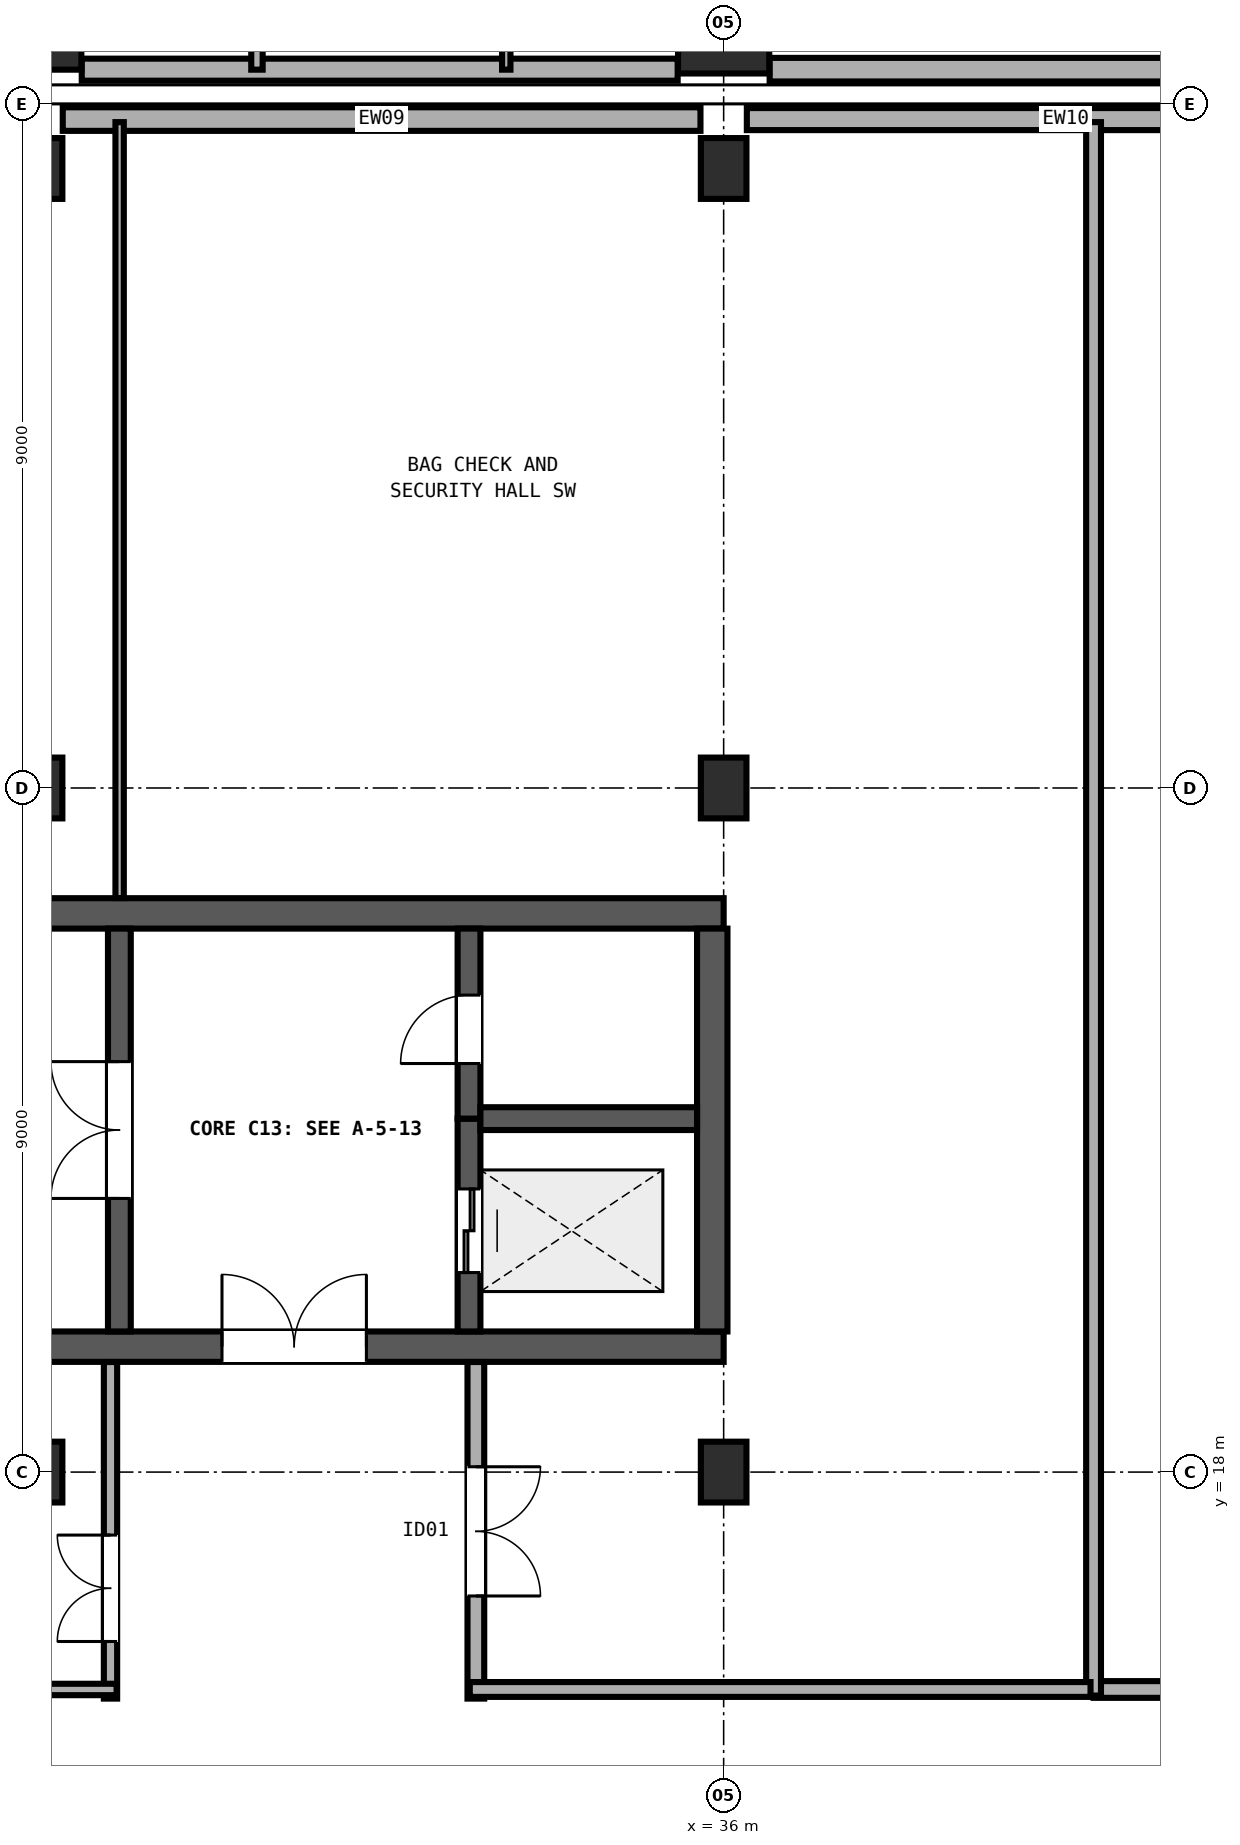
"""IFC4 building model, lengths in metres.
Left out: names, types, materials, properties, quantities, classifications, styles, units other than length and angle.
Written with IfcOpenShell. Run it as: python <this file> out.ifc"""

import sys

from ifc_helpers import new_model, si_unit, direction, frame, frame_2d, origin, origin_2d, place, context, subcontext, project, spatial, rectangle, extrude, element, fill, save


model = new_model("IFC4")
c1 = context("Model", 3, precision=1e-05, world=origin(), true_north=direction((0.0, 1.0)))
c2 = subcontext(c1, "Body", "Model", "MODEL_VIEW")
j1 = project(units=[si_unit("LENGTHUNIT", "METRE"), si_unit("PLANEANGLEUNIT", "RADIAN")], contexts=[c1])
p1 = place(None, origin())
s1 = spatial("IfcSite", under=j1, at=p1, CompositionType="ELEMENT")
p2 = place(p1, origin())
s2 = spatial("IfcBuilding", under=s1, at=p2, CompositionType="ELEMENT")
p3 = place(p2, origin())
s3 = spatial("IfcBuildingStorey", under=s2, at=p3, CompositionType="ELEMENT", Elevation=0.0)
p4 = place(p3, frame((27.0, 37.1, 0.0), z_axis=(0.0, 0.0, 1.0), x_axis=(1.0, 0.0, 0.0)))
e1 = element("IfcColumn", 1, at=p4, inside=s3, PredefinedType="COLUMN", context=c2, shape_type="SweptSolid", body=[
    extrude(rectangle(XDim=1.1, YDim=1.3, at=origin_2d()), origin(), (0.0, 0.0, 1.0), 4.8),
])
p5 = place(p3, frame((36.0, 37.1, 0.0), z_axis=(0.0, 0.0, 1.0), x_axis=(1.0, 0.0, 0.0)))
e2 = element("IfcColumn", 2, at=p5, inside=s3, PredefinedType="COLUMN", context=c2, shape_type="SweptSolid", body=[
    extrude(rectangle(XDim=1.2, YDim=1.4, at=origin_2d()), origin(), (0.0, 0.0, 1.0), 4.8),
])
for number, where, z_axis, x_axis in (
    (3, (27.0, 18.0, 0.0), (0.0, 0.0, 1.0), (1.0, 0.0, 0.0)),
    (4, (27.0, 27.0, 0.0), (0.0, 0.0, 1.0), (1.0, 0.0, 0.0)),
    (5, (27.0, 35.15, 0.0), (0.0, 0.0, 1.0), (1.0, 0.0, 0.0)),
    (6, (36.0, 18.0, 0.0), (0.0, 0.0, 1.0), (1.0, 0.0, 0.0)),
    (7, (36.0, 27.0, 0.0), (0.0, 0.0, 1.0), (1.0, 0.0, 0.0)),
    (8, (36.0, 35.15, 0.0), (0.0, 0.0, 1.0), (1.0, 0.0, 0.0)),
):
    element("IfcColumn", number, at=place(p3, frame(where, z_axis=z_axis, x_axis=x_axis)), inside=s3, PredefinedType="COLUMN", context=c2, shape_type="SweptSolid", body=[
        extrude(rectangle(XDim=0.6, YDim=0.8, at=origin_2d()), origin(), (0.0, 0.0, 1.0), 4.8),
    ])
p6 = place(p3, frame((18.0, 19.65, 0.0), z_axis=(0.0, 0.0, 1.0), x_axis=(1.0, 0.0, 0.0)))
e9 = element("IfcWall", 9, at=p6, inside=s3, PredefinedType="SHEAR", context=c2, shape_type="SweptSolid", body=[
    extrude(rectangle(XDim=18.0, YDim=0.4, at=frame_2d((9.0, 0.0))), origin(), (0.0, 0.0, 1.0), 4.5),
])
p7 = place(p6, frame((11.4, 0.0, 0.0)))
e10 = element("IfcOpeningElement", 10, at=p7, cuts=e9, PredefinedType="OPENING", context=c2, shape_type="SweptSolid", body=[
    extrude(rectangle(XDim=1.9, YDim=2.25, at=frame_2d((0.95, 1.125))), frame((0.0, 0.21, 0.0), z_axis=(0.0, -1.0, 0.0), x_axis=(1.0, 0.0, 0.0)), (0.0, 0.0, 1.0), 0.42),
])
p8 = place(p3, frame((36.0, 25.35, 0.0), z_axis=(0.0, 0.0, 1.0), x_axis=(-1.0, 0.0, 0.0)))
e11 = element("IfcWall", 11, at=p8, inside=s3, PredefinedType="SHEAR", context=c2, shape_type="SweptSolid", body=[
    extrude(rectangle(XDim=18.0, YDim=0.4, at=frame_2d((9.0, 0.0))), origin(), (0.0, 0.0, 1.0), 4.5),
])
p9 = place(p3, frame((35.85, 19.85, 0.0), z_axis=(0.0, 0.0, 1.0), x_axis=(0.0, 1.0, 0.0)))
e12 = element("IfcWall", 12, at=p9, inside=s3, PredefinedType="SHEAR", context=c2, shape_type="SweptSolid", body=[
    extrude(rectangle(XDim=5.3, YDim=0.4, at=frame_2d((2.65, 0.0))), origin(), (0.0, 0.0, 1.0), 4.5),
])
p10 = place(p3, frame((28.05, 19.85, 0.0), z_axis=(0.0, 0.0, 1.0), x_axis=(0.0, 1.0, 0.0)))
e13 = element("IfcWall", 13, at=p10, inside=s3, PredefinedType="SHEAR", context=c2, shape_type="SweptSolid", body=[
    extrude(rectangle(XDim=5.3, YDim=0.3, at=frame_2d((2.65, 0.0))), origin(), (0.0, 0.0, 1.0), 4.5),
])
p11 = place(p10, frame((1.75, 0.0, 0.0)))
e14 = element("IfcOpeningElement", 14, at=p11, cuts=e13, PredefinedType="OPENING", context=c2, shape_type="SweptSolid", body=[
    extrude(rectangle(XDim=1.8, YDim=2.25, at=frame_2d((0.9, 1.125))), frame((0.0, 0.16, 0.0), z_axis=(0.0, -1.0, 0.0), x_axis=(1.0, 0.0, 0.0)), (0.0, 0.0, 1.0), 0.32),
])
p12 = place(p3, frame((32.65, 19.85, 0.0), z_axis=(0.0, 0.0, 1.0), x_axis=(0.0, 1.0, 0.0)))
e15 = element("IfcWall", 15, at=p12, inside=s3, PredefinedType="SHEAR", context=c2, shape_type="SweptSolid", body=[
    extrude(rectangle(XDim=2.8, YDim=0.3, at=frame_2d((1.4, 0.0))), origin(), (0.0, 0.0, 1.0), 4.5),
])
p13 = place(p12, frame((0.775, 0.0, 0.0)))
e16 = element("IfcOpeningElement", 16, at=p13, cuts=e15, PredefinedType="OPENING", context=c2, shape_type="SweptSolid", body=[
    extrude(rectangle(XDim=1.1, YDim=2.1, at=frame_2d((0.55, 1.05))), frame((0.0, 0.16, 0.0), z_axis=(0.0, -1.0, 0.0), x_axis=(1.0, 0.0, 0.0)), (0.0, 0.0, 1.0), 0.32),
])
p14 = place(p3, frame((32.65, 22.65, 0.0), z_axis=(0.0, 0.0, 1.0), x_axis=(0.0, 1.0, 0.0)))
e17 = element("IfcWall", 17, at=p14, inside=s3, PredefinedType="SHEAR", context=c2, shape_type="SweptSolid", body=[
    extrude(rectangle(XDim=2.5, YDim=0.3, at=frame_2d((1.25, 0.0))), origin(), (0.0, 0.0, 1.0), 4.5),
])
p15 = place(p14, frame((0.725, 0.0, 0.0)))
e18 = element("IfcOpeningElement", 18, at=p15, cuts=e17, PredefinedType="OPENING", context=c2, shape_type="SweptSolid", body=[
    extrude(rectangle(XDim=0.9, YDim=2.1, at=frame_2d((0.45, 1.05))), frame((0.0, 0.16, 0.0), z_axis=(0.0, -1.0, 0.0), x_axis=(1.0, 0.0, 0.0)), (0.0, 0.0, 1.0), 0.32),
])
p16 = place(p3, frame((32.8, 22.65, 0.0), z_axis=(0.0, 0.0, 1.0), x_axis=(1.0, 0.0, 0.0)))
e19 = element("IfcWall", 19, at=p16, inside=s3, PredefinedType="SHEAR", context=c2, shape_type="SweptSolid", body=[
    extrude(rectangle(XDim=2.85, YDim=0.3, at=frame_2d((1.425, 0.0))), origin(), (0.0, 0.0, 1.0), 4.5),
])
p17 = place(p3, frame((43.745, 36.45, 0.0), z_axis=(0.0, 0.0, 1.0), x_axis=(-1.0, 0.0, 0.0)))
e20 = element("IfcWall", 20, at=p17, inside=s3, PredefinedType="SOLIDWALL", context=c2, shape_type="SweptSolid", body=[
    extrude(rectangle(XDim=7.14, YDim=0.31, at=frame_2d((3.57, 0.0))), origin(), (0.0, 0.0, 1.0), 3.28),
])
p18 = place(p3, frame((35.395, 36.45, 0.0), z_axis=(0.0, 0.0, 1.0), x_axis=(-1.0, 0.0, 0.0)))
e21 = element("IfcWall", 21, at=p18, inside=s3, PredefinedType="SOLIDWALL", context=c2, shape_type="SweptSolid", body=[
    extrude(rectangle(XDim=7.84, YDim=0.29, at=frame_2d((3.92, 0.0))), origin(), (0.0, 0.0, 1.0), 3.28),
])
p19 = place(p3, frame((27.305, 35.8, 0.0), z_axis=(0.0, 0.0, 1.0), x_axis=(1.0, 0.0, 0.0)))
e22 = element("IfcWall", 22, at=p19, inside=s3, PredefinedType="SOLIDWALL", context=c2, shape_type="SweptSolid", body=[
    extrude(rectangle(XDim=8.39, YDim=0.31, at=frame_2d((4.195, 0.0))), origin(), (0.0, 0.0, 1.0), 3.28),
])
p20 = place(p3, frame((36.305, 35.8, 0.0), z_axis=(0.0, 0.0, 1.0), x_axis=(1.0, 0.0, 0.0)))
e23 = element("IfcWall", 23, at=p20, inside=s3, PredefinedType="SOLIDWALL", context=c2, shape_type="SweptSolid", body=[
    extrude(rectangle(XDim=8.39, YDim=0.29, at=frame_2d((4.195, 0.0))), origin(), (0.0, 0.0, 1.0), 3.28),
])
p21 = place(p3, frame((29.86, 36.45, 0.0), z_axis=(0.0, 0.0, 1.0), x_axis=(0.0, 1.0, 0.0)))
e24 = element("IfcWall", 24, at=p21, inside=s3, PredefinedType="PARTITIONING", context=c2, shape_type="SweptSolid", body=[
    extrude(rectangle(XDim=22.78, YDim=0.15, at=frame_2d((11.39, 0.0))), origin(), (0.0, 0.0, 1.0), 3.28),
])
p22 = place(p21, frame((10.615, 0.0, 0.0)))
e25 = element("IfcOpeningElement", 25, at=p22, cuts=e24, PredefinedType="OPENING", context=c2, shape_type="SweptSolid", body=[
    extrude(rectangle(XDim=1.55, YDim=2.2, at=frame_2d((0.775, 1.1))), frame((0.0, 0.085, 0.0), z_axis=(0.0, -1.0, 0.0), x_axis=(1.0, 0.0, 0.0)), (0.0, 0.0, 1.0), 0.17),
])
p23 = place(p3, frame((33.14, 54.342, 0.0), z_axis=(0.0, 0.0, 1.0), x_axis=(0.0, -1.0, 0.0)))
e26 = element("IfcWall", 26, at=p23, inside=s3, PredefinedType="PARTITIONING", context=c2, shape_type="SweptSolid", body=[
    extrude(rectangle(XDim=17.892, YDim=0.11, at=frame_2d((8.946, 0.0))), origin(), (0.0, 0.0, 1.0), 3.28),
])
p24 = place(p23, frame((8.246, 0.0, 0.0)))
e27 = element("IfcOpeningElement", 27, at=p24, cuts=e26, PredefinedType="OPENING", context=c2, shape_type="SweptSolid", body=[
    extrude(rectangle(XDim=1.4, YDim=2.15, at=frame_2d((0.7, 1.075))), frame((0.0, 0.065, 0.0), z_axis=(0.0, -1.0, 0.0), x_axis=(1.0, 0.0, 0.0)), (0.0, 0.0, 1.0), 0.13),
])
p25 = place(p3, frame((40.867, 15.14, 0.0), z_axis=(0.0, 0.0, 1.0), x_axis=(1.0, 0.0, 0.0)))
e28 = element("IfcWall", 28, at=p25, inside=s3, PredefinedType="PARTITIONING", context=c2, shape_type="SweptSolid", body=[
    extrude(rectangle(XDim=12.933, YDim=0.22, at=frame_2d((6.467, 0.0))), origin(), (0.0, 0.0, 1.0), 3.28),
])
p26 = place(p25, frame((5.692, 0.0, 0.0)))
e29 = element("IfcOpeningElement", 29, at=p26, cuts=e28, PredefinedType="OPENING", context=c2, shape_type="SweptSolid", body=[
    extrude(rectangle(XDim=1.55, YDim=2.2, at=frame_2d((0.775, 1.1))), frame((0.0, 0.12, 0.0), z_axis=(0.0, -1.0, 0.0), x_axis=(1.0, 0.0, 0.0)), (0.0, 0.0, 1.0), 0.24),
])
p27 = place(p3, frame((40.867, 15.06, 0.0), z_axis=(0.0, 0.0, 1.0), x_axis=(0.0, 1.0, 0.0)))
e30 = element("IfcWall", 30, at=p27, inside=s3, PredefinedType="PARTITIONING", context=c2, shape_type="SweptSolid", body=[
    extrude(rectangle(XDim=20.7, YDim=0.195, at=frame_2d((10.35, 0.0))), origin(), (0.0, 0.0, 1.0), 3.28),
])
p28 = place(p3, frame((27.933, 15.02, 0.0), z_axis=(0.0, 0.0, 1.0), x_axis=(0.0, 1.0, 0.0)))
e31 = element("IfcWall", 31, at=p28, inside=s3, PredefinedType="PARTITIONING", context=c2, shape_type="SweptSolid", body=[
    extrude(rectangle(XDim=4.428, YDim=0.175, at=frame_2d((2.214, 0.0))), origin(), (0.0, 0.0, 1.0), 3.28),
])
p29 = place(p28, frame((0.751, 0.0, 0.0)))
e32 = element("IfcOpeningElement", 32, at=p29, cuts=e31, PredefinedType="OPENING", context=c2, shape_type="SweptSolid", body=[
    extrude(rectangle(XDim=1.4, YDim=2.15, at=frame_2d((0.7, 1.075))), frame((0.0, 0.097, 0.0), z_axis=(0.0, -1.0, 0.0), x_axis=(1.0, 0.0, 0.0)), (0.0, 0.0, 1.0), 0.195),
])
p30 = place(p3, frame((28.013, 15.14, 0.0), z_axis=(0.0, 0.0, 1.0), x_axis=(-1.0, 0.0, 0.0)))
e33 = element("IfcWall", 33, at=p30, inside=s3, PredefinedType="PARTITIONING", context=c2, shape_type="SweptSolid", body=[
    extrude(rectangle(XDim=12.853, YDim=0.15, at=frame_2d((6.427, 0.0))), origin(), (0.0, 0.0, 1.0), 3.28),
])
p31 = place(p3, frame((28.053, 35.76, 0.0), z_axis=(0.0, 0.0, 1.0), x_axis=(0.0, -1.0, 0.0)))
e34 = element("IfcWall", 34, at=p31, inside=s3, PredefinedType="PARTITIONING", context=c2, shape_type="SweptSolid", body=[
    extrude(rectangle(XDim=10.208, YDim=0.11, at=frame_2d((5.104, 0.0))), origin(), (0.0, 0.0, 1.0), 3.28),
])
p32 = place(p3, frame((32.74, 19.448, 0.0), z_axis=(0.0, 0.0, 1.0), x_axis=(0.0, -1.0, 0.0)))
e35 = element("IfcWall", 35, at=p32, inside=s3, PredefinedType="PARTITIONING", context=c2, shape_type="SweptSolid", body=[
    extrude(rectangle(XDim=4.428, YDim=0.22, at=frame_2d((2.214, 0.0))), origin(), (0.0, 0.0, 1.0), 3.28),
])
p33 = place(p32, frame((1.378, 0.0, 0.0)))
e36 = element("IfcOpeningElement", 36, at=p33, cuts=e35, PredefinedType="OPENING", context=c2, shape_type="SweptSolid", body=[
    extrude(rectangle(XDim=1.7, YDim=2.2, at=frame_2d((0.85, 1.1))), frame((0.0, 0.12, 0.0), z_axis=(0.0, -1.0, 0.0), x_axis=(1.0, 0.0, 0.0)), (0.0, 0.0, 1.0), 0.24),
])
p34 = place(p3, frame((40.827, 15.14, 0.0), z_axis=(0.0, 0.0, 1.0), x_axis=(-1.0, 0.0, 0.0)))
e37 = element("IfcWall", 37, at=p34, inside=s3, PredefinedType="PARTITIONING", context=c2, shape_type="SweptSolid", body=[
    extrude(rectangle(XDim=8.167, YDim=0.195, at=frame_2d((4.083, 0.0))), origin(), (0.0, 0.0, 1.0), 3.28),
])
p35 = place(p11, origin())
e38 = element("IfcDoor", 38, at=p35, inside=s3, OperationType="DOUBLE_DOOR_SINGLE_SWING", PredefinedType="DOOR", context=c2, shape_type="SweptSolid", body=[
    extrude(rectangle(XDim=1.8, YDim=2.25, at=frame_2d((0.9, 1.125))), frame((0.0, 0.025, 0.0), z_axis=(0.0, -1.0, 0.0), x_axis=(1.0, 0.0, 0.0)), (0.0, 0.0, 1.0), 0.05),
])
fill(e14, e38)
p36 = place(p15, origin())
e39 = element("IfcDoor", 39, at=p36, inside=s3, OperationType="SINGLE_SWING_LEFT", PredefinedType="DOOR", context=c2, shape_type="SweptSolid", body=[
    extrude(rectangle(XDim=0.9, YDim=2.1, at=frame_2d((0.45, 1.05))), frame((0.0, 0.025, 0.0), z_axis=(0.0, -1.0, 0.0), x_axis=(1.0, 0.0, 0.0)), (0.0, 0.0, 1.0), 0.05),
])
fill(e18, e39)
p37 = place(p13, origin())
e40 = element("IfcDoor", 40, at=p37, inside=s3, OperationType="DOUBLE_DOOR_SLIDING", PredefinedType="DOOR", context=c2, shape_type="SweptSolid", body=[
    extrude(rectangle(XDim=1.1, YDim=2.1, at=frame_2d((0.55, 1.05))), frame((0.0, 0.025, 0.0), z_axis=(0.0, -1.0, 0.0), x_axis=(1.0, 0.0, 0.0)), (0.0, 0.0, 1.0), 0.05),
])
fill(e16, e40)
p38 = place(p7, origin())
e41 = element("IfcDoor", 41, at=p38, inside=s3, OperationType="DOUBLE_DOOR_SINGLE_SWING", PredefinedType="DOOR", context=c2, shape_type="SweptSolid", body=[
    extrude(rectangle(XDim=1.9, YDim=2.25, at=frame_2d((0.95, 1.125))), frame((0.0, 0.025, 0.0), z_axis=(0.0, -1.0, 0.0), x_axis=(1.0, 0.0, 0.0)), (0.0, 0.0, 1.0), 0.05),
])
fill(e10, e41)
p39 = place(p29, origin())
e42 = element("IfcDoor", 42, at=p39, inside=s3, OperationType="DOUBLE_DOOR_SINGLE_SWING", PredefinedType="DOOR", context=c2, shape_type="SweptSolid", body=[
    extrude(rectangle(XDim=1.4, YDim=2.15, at=frame_2d((0.7, 1.075))), frame((0.0, 0.025, 0.0), z_axis=(0.0, -1.0, 0.0), x_axis=(1.0, 0.0, 0.0)), (0.0, 0.0, 1.0), 0.05),
])
fill(e32, e42)
p40 = place(p33, origin())
e43 = element("IfcDoor", 43, at=p40, inside=s3, OperationType="DOUBLE_DOOR_SINGLE_SWING", PredefinedType="DOOR", context=c2, shape_type="SweptSolid", body=[
    extrude(rectangle(XDim=1.7, YDim=2.2, at=frame_2d((0.85, 1.1))), frame((0.0, 0.025, 0.0), z_axis=(0.0, -1.0, 0.0), x_axis=(1.0, 0.0, 0.0)), (0.0, 0.0, 1.0), 0.05),
])
fill(e36, e43)
save(model, sys.argv[1])
